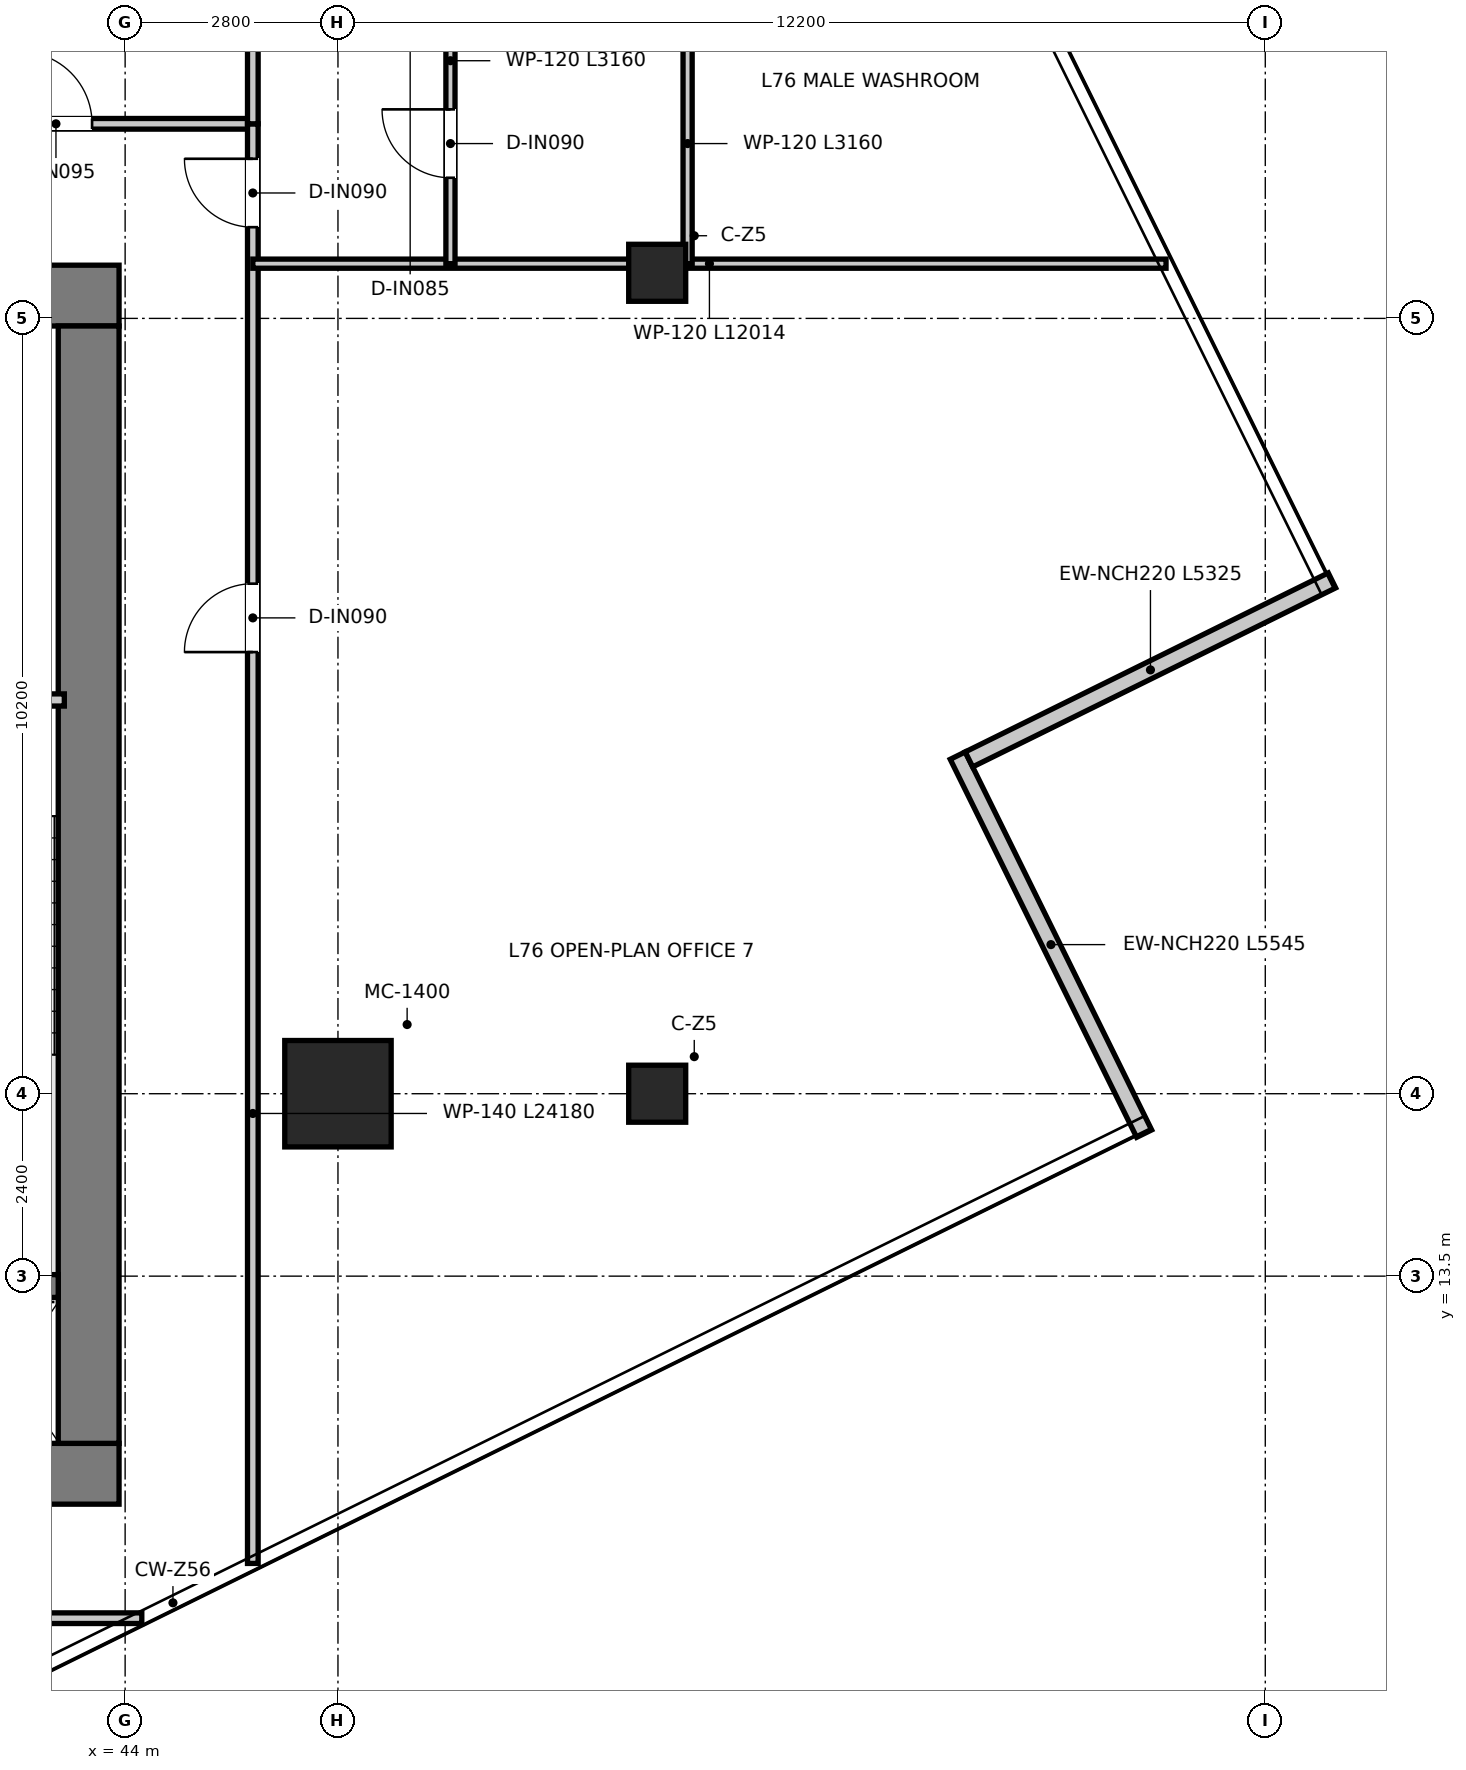
"""IFC4 building model, lengths in metres.
Left out: names, types, materials, properties, quantities, classifications, styles, units other than length and angle.
Written with IfcOpenShell. Run it as: python <this file> out.ifc"""

import sys

from ifc_helpers import new_model, si_unit, direction, frame, frame_2d, origin, origin_2d, place, context, subcontext, project, spatial, rectangle, extrude, source, transform, mapped, element, fill, save


model = new_model("IFC4")
c1 = context("Model", 3, precision=1e-05, world=origin(), true_north=direction((0.0, 1.0)))
c2 = subcontext(c1, "Body", "Model", "MODEL_VIEW")
j1 = project(units=[si_unit("LENGTHUNIT", "METRE"), si_unit("PLANEANGLEUNIT", "RADIAN")], contexts=[c1])
p1 = place(None, origin())
s1 = spatial("IfcSite", under=j1, at=p1, CompositionType="ELEMENT")
p2 = place(p1, origin())
s2 = spatial("IfcBuilding", under=s1, at=p2, CompositionType="ELEMENT")
p3 = place(p2, frame((0.0, 0.0, 310.85)))
s3 = spatial("IfcBuildingStorey", under=s2, at=p3, CompositionType="ELEMENT", Elevation=310.85)
p4 = place(p3, frame((28.08, 10.9, 0.0), z_axis=(0.0, 0.0, 1.0), x_axis=(1.0, 0.0, 0.0)))
e1 = element("IfcWall", 1, at=p4, inside=s3, PredefinedType="SHEAR", context=c2, shape_type="SweptSolid", body=[
    extrude(rectangle(XDim=15.84, YDim=0.8, at=frame_2d((7.92, 0.0))), origin(), (0.0, 0.0, 1.0), 3.95),
])
p5 = place(p3, frame((28.08, 26.4, 0.0), z_axis=(0.0, 0.0, 1.0), x_axis=(1.0, 0.0, 0.0)))
e2 = element("IfcWall", 2, at=p5, inside=s3, PredefinedType="SHEAR", context=c2, shape_type="SweptSolid", body=[
    extrude(rectangle(XDim=15.84, YDim=0.8, at=frame_2d((7.92, 0.0))), origin(), (0.0, 0.0, 1.0), 3.95),
])
p6 = place(p5, frame((7.22, 0.0, 0.0)))
e3 = element("IfcOpeningElement", 3, at=p6, cuts=e2, PredefinedType="OPENING", context=c2, shape_type="SweptSolid", body=[
    extrude(rectangle(XDim=1.4, YDim=2.2, at=frame_2d((0.7, 1.1))), frame((0.0, 0.41, 0.0), z_axis=(0.0, -1.0, 0.0), x_axis=(1.0, 0.0, 0.0)), (0.0, 0.0, 1.0), 0.82),
])
p7 = place(p5, frame((1.775, 0.0, 0.0)))
e4 = element("IfcOpeningElement", 4, at=p7, cuts=e2, PredefinedType="OPENING", context=c2, shape_type="SweptSolid", body=[
    extrude(rectangle(XDim=1.05, YDim=2.1, at=frame_2d((0.525, 1.05))), frame((0.0, 0.41, 0.0), z_axis=(0.0, -1.0, 0.0), x_axis=(1.0, 0.0, 0.0)), (0.0, 0.0, 1.0), 0.82),
])
p8 = place(p5, frame((13.015, 0.0, 0.0)))
e5 = element("IfcOpeningElement", 5, at=p8, cuts=e2, PredefinedType="OPENING", context=c2, shape_type="SweptSolid", body=[
    extrude(rectangle(XDim=1.05, YDim=2.1, at=frame_2d((0.525, 1.05))), frame((0.0, 0.41, 0.0), z_axis=(0.0, -1.0, 0.0), x_axis=(1.0, 0.0, 0.0)), (0.0, 0.0, 1.0), 0.82),
])
p9 = place(p3, frame((43.52, 11.3, 0.0), z_axis=(0.0, 0.0, 1.0), x_axis=(0.0, 1.0, 0.0)))
e6 = element("IfcWall", 6, at=p9, inside=s3, PredefinedType="SHEAR", context=c2, shape_type="SweptSolid", body=[
    extrude(rectangle(XDim=14.7, YDim=0.8, at=frame_2d((7.35, 0.0))), origin(), (0.0, 0.0, 1.0), 3.95),
])
p10 = place(p3, frame((40.02, 13.37, 0.0), z_axis=(0.0, 0.0, 1.0), x_axis=(1.0, 0.0, 0.0)))
e7 = element("IfcWall", 7, at=p10, inside=s3, PredefinedType="SHEAR", context=c2, shape_type="SweptSolid", body=[
    extrude(rectangle(XDim=3.1, YDim=0.3, at=frame_2d((1.55, 0.0))), origin(), (0.0, 0.0, 1.0), 3.95),
])
m1 = source(origin(), c2, "Body", "SweptSolid", [
    extrude(rectangle(XDim=1.4, YDim=1.4, at=origin_2d()), origin(), (0.0, 0.0, 1.0), 3.95),
])
p11 = place(p3, frame((46.8, 15.9, 0.0), z_axis=(0.0, 0.0, 1.0), x_axis=(1.0, 0.0, 0.0)))
e8 = element("IfcColumn", 8, at=p11, inside=s3, PredefinedType="USERDEFINED", context=c2, shape_type="MappedRepresentation", body=[
    mapped(m1, transform((0.0, 0.0, 0.0), x_axis=(1.0, 0.0, 0.0), y_axis=(0.0, 1.0, 0.0), z_axis=(0.0, 0.0, 1.0), scale=1.0)),
])
m2 = source(origin(), c2, "Body", "SweptSolid", [
    extrude(rectangle(XDim=0.75, YDim=0.75, at=origin_2d()), origin(), (0.0, 0.0, 1.0), 3.95),
])
for number, where, z_axis, x_axis in (
    (9, (51.0, 26.7, 0.0), (0.0, 0.0, 1.0), (1.0, 0.0, 0.0)),
    (10, (51.0, 15.9, 0.0), (0.0, 0.0, 1.0), (1.0, 0.0, 0.0)),
):
    element("IfcColumn", number, at=place(p3, frame(where, z_axis=z_axis, x_axis=x_axis)), inside=s3, PredefinedType="COLUMN", context=c2, shape_type="MappedRepresentation", body=[
        mapped(m2, transform((0.0, 0.0, 0.0), x_axis=(1.0, 0.0, 0.0), y_axis=(0.0, 1.0, 0.0), z_axis=(0.0, 0.0, 1.0), scale=1.0)),
    ])
p12 = place(p3, frame((57.406, 15.375, 0.0), z_axis=(0.0, 0.0, 1.0), x_axis=(-0.442275503639, 0.896879244314, 0.0)))
e11 = element("IfcWall", 11, at=p12, inside=s3, PredefinedType="ELEMENTEDWALL", context=c2, shape_type="SweptSolid", body=[
    extrude(rectangle(XDim=5.545, YDim=0.22, at=frame_2d((2.772, 0.0))), origin(), (0.0, 0.0, 1.0), 3.67),
])
p13 = place(p3, frame((55.101, 20.298, 0.0), z_axis=(0.0, 0.0, 1.0), x_axis=(0.896871119712, 0.442291978932, 0.0)))
e12 = element("IfcWall", 12, at=p13, inside=s3, PredefinedType="ELEMENTEDWALL", context=c2, shape_type="SweptSolid", body=[
    extrude(rectangle(XDim=5.325, YDim=0.22, at=frame_2d((2.663, 0.0))), origin(), (0.0, 0.0, 1.0), 3.67),
])
p14 = place(p3, frame((40.04, 21.08, 0.0), z_axis=(0.0, 0.0, 1.0), x_axis=(1.0, 0.0, 0.0)))
e13 = element("IfcWall", 13, at=p14, inside=s3, PredefinedType="PARTITIONING", context=c2, shape_type="SweptSolid", body=[
    extrude(rectangle(XDim=3.16, YDim=0.16, at=frame_2d((1.58, 0.0))), origin(), (0.0, 0.0, 1.0), 3.67),
])
p15 = place(p14, frame((1.055, 0.0, 0.0)))
e14 = element("IfcOpeningElement", 14, at=p15, cuts=e13, PredefinedType="OPENING", context=c2, shape_type="SweptSolid", body=[
    extrude(rectangle(XDim=1.05, YDim=2.1, at=frame_2d((0.525, 1.05))), frame((0.0, 0.09, 0.0), z_axis=(0.0, -1.0, 0.0), x_axis=(1.0, 0.0, 0.0)), (0.0, 0.0, 1.0), 0.18),
])
p16 = place(p3, frame((26.32, 28.66, 0.0), z_axis=(0.0, 0.0, 1.0), x_axis=(1.0, 0.0, 0.0)))
e15 = element("IfcWall", 15, at=p16, inside=s3, PredefinedType="PARTITIONING", context=c2, shape_type="SweptSolid", body=[
    extrude(rectangle(XDim=19.36, YDim=0.14, at=frame_2d((9.68, 0.0))), origin(), (0.0, 0.0, 1.0), 3.18),
])
p17 = place(p16, frame((2.865, 0.0, 0.0)))
e16 = element("IfcOpeningElement", 16, at=p17, cuts=e15, PredefinedType="OPENING", context=c2, shape_type="SweptSolid", body=[
    extrude(rectangle(XDim=0.95, YDim=2.1, at=frame_2d((0.475, 1.05))), frame((0.0, 0.08, 0.0), z_axis=(0.0, -1.0, 0.0), x_axis=(1.0, 0.0, 0.0)), (0.0, 0.0, 1.0), 0.16),
])
p18 = place(p16, frame((9.955, 0.0, 0.0)))
e17 = element("IfcOpeningElement", 17, at=p18, cuts=e15, PredefinedType="OPENING", context=c2, shape_type="SweptSolid", body=[
    extrude(rectangle(XDim=0.95, YDim=2.1, at=frame_2d((0.475, 1.05))), frame((0.0, 0.08, 0.0), z_axis=(0.0, -1.0, 0.0), x_axis=(1.0, 0.0, 0.0)), (0.0, 0.0, 1.0), 0.16),
])
p19 = place(p16, frame((16.295, 0.0, 0.0)))
e18 = element("IfcOpeningElement", 18, at=p19, cuts=e15, PredefinedType="OPENING", context=c2, shape_type="SweptSolid", body=[
    extrude(rectangle(XDim=0.95, YDim=2.1, at=frame_2d((0.475, 1.05))), frame((0.0, 0.08, 0.0), z_axis=(0.0, -1.0, 0.0), x_axis=(1.0, 0.0, 0.0)), (0.0, 0.0, 1.0), 0.16),
])
p20 = place(p3, frame((45.68, 9.72, 0.0), z_axis=(0.0, 0.0, 1.0), x_axis=(0.0, 1.0, 0.0)))
e19 = element("IfcWall", 19, at=p20, inside=s3, PredefinedType="PARTITIONING", context=c2, shape_type="SweptSolid", body=[
    extrude(rectangle(XDim=18.94, YDim=0.14, at=frame_2d((9.47, 0.0))), origin(), (0.0, 0.0, 1.0), 3.13),
])
p21 = place(p20, frame((17.58, 0.0, 0.0)))
e20 = element("IfcOpeningElement", 20, at=p21, cuts=e19, PredefinedType="OPENING", context=c2, shape_type="SweptSolid", body=[
    extrude(rectangle(XDim=0.9, YDim=2.1, at=frame_2d((0.45, 1.05))), frame((0.0, 0.08, 0.0), z_axis=(0.0, -1.0, 0.0), x_axis=(1.0, 0.0, 0.0)), (0.0, 0.0, 1.0), 0.16),
])
p22 = place(p20, frame((11.99, 0.0, 0.0)))
e21 = element("IfcOpeningElement", 21, at=p22, cuts=e19, PredefinedType="OPENING", context=c2, shape_type="SweptSolid", body=[
    extrude(rectangle(XDim=0.9, YDim=2.1, at=frame_2d((0.45, 1.05))), frame((0.0, 0.08, 0.0), z_axis=(0.0, -1.0, 0.0), x_axis=(1.0, 0.0, 0.0)), (0.0, 0.0, 1.0), 0.16),
])
p23 = place(p3, frame((22.975, 9.0, 0.0), z_axis=(0.0, 0.0, 1.0), x_axis=(1.0, 0.0, 0.0)))
e22 = element("IfcWall", 22, at=p23, inside=s3, PredefinedType="PARTITIONING", context=c2, shape_type="SweptSolid", body=[
    extrude(rectangle(XDim=21.244, YDim=0.14, at=frame_2d((10.622, 0.0))), origin(), (0.0, 0.0, 1.0), 3.67),
])
p24 = place(p23, frame((8.6, 0.0, 0.0)))
e23 = element("IfcOpeningElement", 23, at=p24, cuts=e22, PredefinedType="OPENING", context=c2, shape_type="SweptSolid", body=[
    extrude(rectangle(XDim=0.85, YDim=2.1, at=frame_2d((0.425, 1.05))), frame((0.0, 0.08, 0.0), z_axis=(0.0, -1.0, 0.0), x_axis=(1.0, 0.0, 0.0)), (0.0, 0.0, 1.0), 0.16),
])
p25 = place(p23, frame((16.6, 0.0, 0.0)))
e24 = element("IfcOpeningElement", 24, at=p25, cuts=e22, PredefinedType="OPENING", context=c2, shape_type="SweptSolid", body=[
    extrude(rectangle(XDim=0.85, YDim=2.1, at=frame_2d((0.425, 1.05))), frame((0.0, 0.08, 0.0), z_axis=(0.0, -1.0, 0.0), x_axis=(1.0, 0.0, 0.0)), (0.0, 0.0, 1.0), 0.16),
])
p26 = place(p3, frame((45.68, 26.82, 0.0), z_axis=(0.0, 0.0, 1.0), x_axis=(1.0, 0.0, 0.0)))
e25 = element("IfcWall", 25, at=p26, inside=s3, PredefinedType="PARTITIONING", context=c2, shape_type="SweptSolid", body=[
    extrude(rectangle(XDim=12.014, YDim=0.12, at=frame_2d((6.007, 0.0))), origin(), (0.0, 0.0, 1.0), 3.13),
])
p27 = place(p3, frame((51.4, 26.82, 0.0), z_axis=(0.0, 0.0, 1.0), x_axis=(0.0, 1.0, 0.0)))
e26 = element("IfcWall", 26, at=p27, inside=s3, PredefinedType="PARTITIONING", context=c2, shape_type="SweptSolid", body=[
    extrude(rectangle(XDim=3.16, YDim=0.12, at=frame_2d((1.58, 0.0))), origin(), (0.0, 0.0, 1.0), 3.67),
])
p28 = place(p3, frame((48.28, 26.82, 0.0), z_axis=(0.0, 0.0, 1.0), x_axis=(0.0, 1.0, 0.0)))
e27 = element("IfcWall", 27, at=p28, inside=s3, PredefinedType="PARTITIONING", context=c2, shape_type="SweptSolid", body=[
    extrude(rectangle(XDim=3.16, YDim=0.12, at=frame_2d((1.58, 0.0))), origin(), (0.0, 0.0, 1.0), 3.18),
])
p29 = place(p28, frame((1.13, 0.0, 0.0)))
e28 = element("IfcOpeningElement", 28, at=p29, cuts=e27, PredefinedType="OPENING", context=c2, shape_type="SweptSolid", body=[
    extrude(rectangle(XDim=0.9, YDim=2.1, at=frame_2d((0.45, 1.05))), frame((0.0, 0.07, 0.0), z_axis=(0.0, -1.0, 0.0), x_axis=(1.0, 0.0, 0.0)), (0.0, 0.0, 1.0), 0.14),
])
p30 = place(p3, frame((45.68, 28.66, 0.0), z_axis=(0.0, 0.0, 1.0), x_axis=(0.0, 1.0, 0.0)))
e29 = element("IfcWall", 29, at=p30, inside=s3, PredefinedType="PARTITIONING", context=c2, shape_type="SweptSolid", body=[
    extrude(rectangle(XDim=5.24, YDim=0.14, at=frame_2d((2.62, 0.0))), origin(), (0.0, 0.0, 1.0), 3.43),
])
p31 = place(p21, origin())
e30 = element("IfcDoor", 30, at=p31, inside=s3, OperationType="SINGLE_SWING_RIGHT", PredefinedType="DOOR", context=c2, shape_type="SweptSolid", body=[
    extrude(rectangle(XDim=0.9, YDim=2.1, at=frame_2d((0.45, 1.05))), frame((0.0, 0.025, 0.0), z_axis=(0.0, -1.0, 0.0), x_axis=(1.0, 0.0, 0.0)), (0.0, 0.0, 1.0), 0.05),
])
fill(e20, e30)
p32 = place(p29, origin())
e31 = element("IfcDoor", 31, at=p32, inside=s3, OperationType="SINGLE_SWING_RIGHT", PredefinedType="DOOR", context=c2, shape_type="SweptSolid", body=[
    extrude(rectangle(XDim=0.9, YDim=2.1, at=frame_2d((0.45, 1.05))), frame((0.0, 0.025, 0.0), z_axis=(0.0, -1.0, 0.0), x_axis=(1.0, 0.0, 0.0)), (0.0, 0.0, 1.0), 0.05),
])
fill(e28, e31)
p33 = place(p19, origin())
e32 = element("IfcDoor", 32, at=p33, inside=s3, OperationType="SINGLE_SWING_LEFT", PredefinedType="DOOR", context=c2, shape_type="SweptSolid", body=[
    extrude(rectangle(XDim=0.95, YDim=2.1, at=frame_2d((0.475, 1.05))), frame((0.0, 0.025, 0.0), z_axis=(0.0, -1.0, 0.0), x_axis=(1.0, 0.0, 0.0)), (0.0, 0.0, 1.0), 0.05),
])
fill(e18, e32)
p34 = place(p22, origin())
e33 = element("IfcDoor", 33, at=p34, inside=s3, OperationType="SINGLE_SWING_LEFT", PredefinedType="DOOR", context=c2, shape_type="SweptSolid", body=[
    extrude(rectangle(XDim=0.9, YDim=2.1, at=frame_2d((0.45, 1.05))), frame((0.0, 0.025, 0.0), z_axis=(0.0, -1.0, 0.0), x_axis=(1.0, 0.0, 0.0)), (0.0, 0.0, 1.0), 0.05),
])
fill(e21, e33)
save(model, sys.argv[1])
